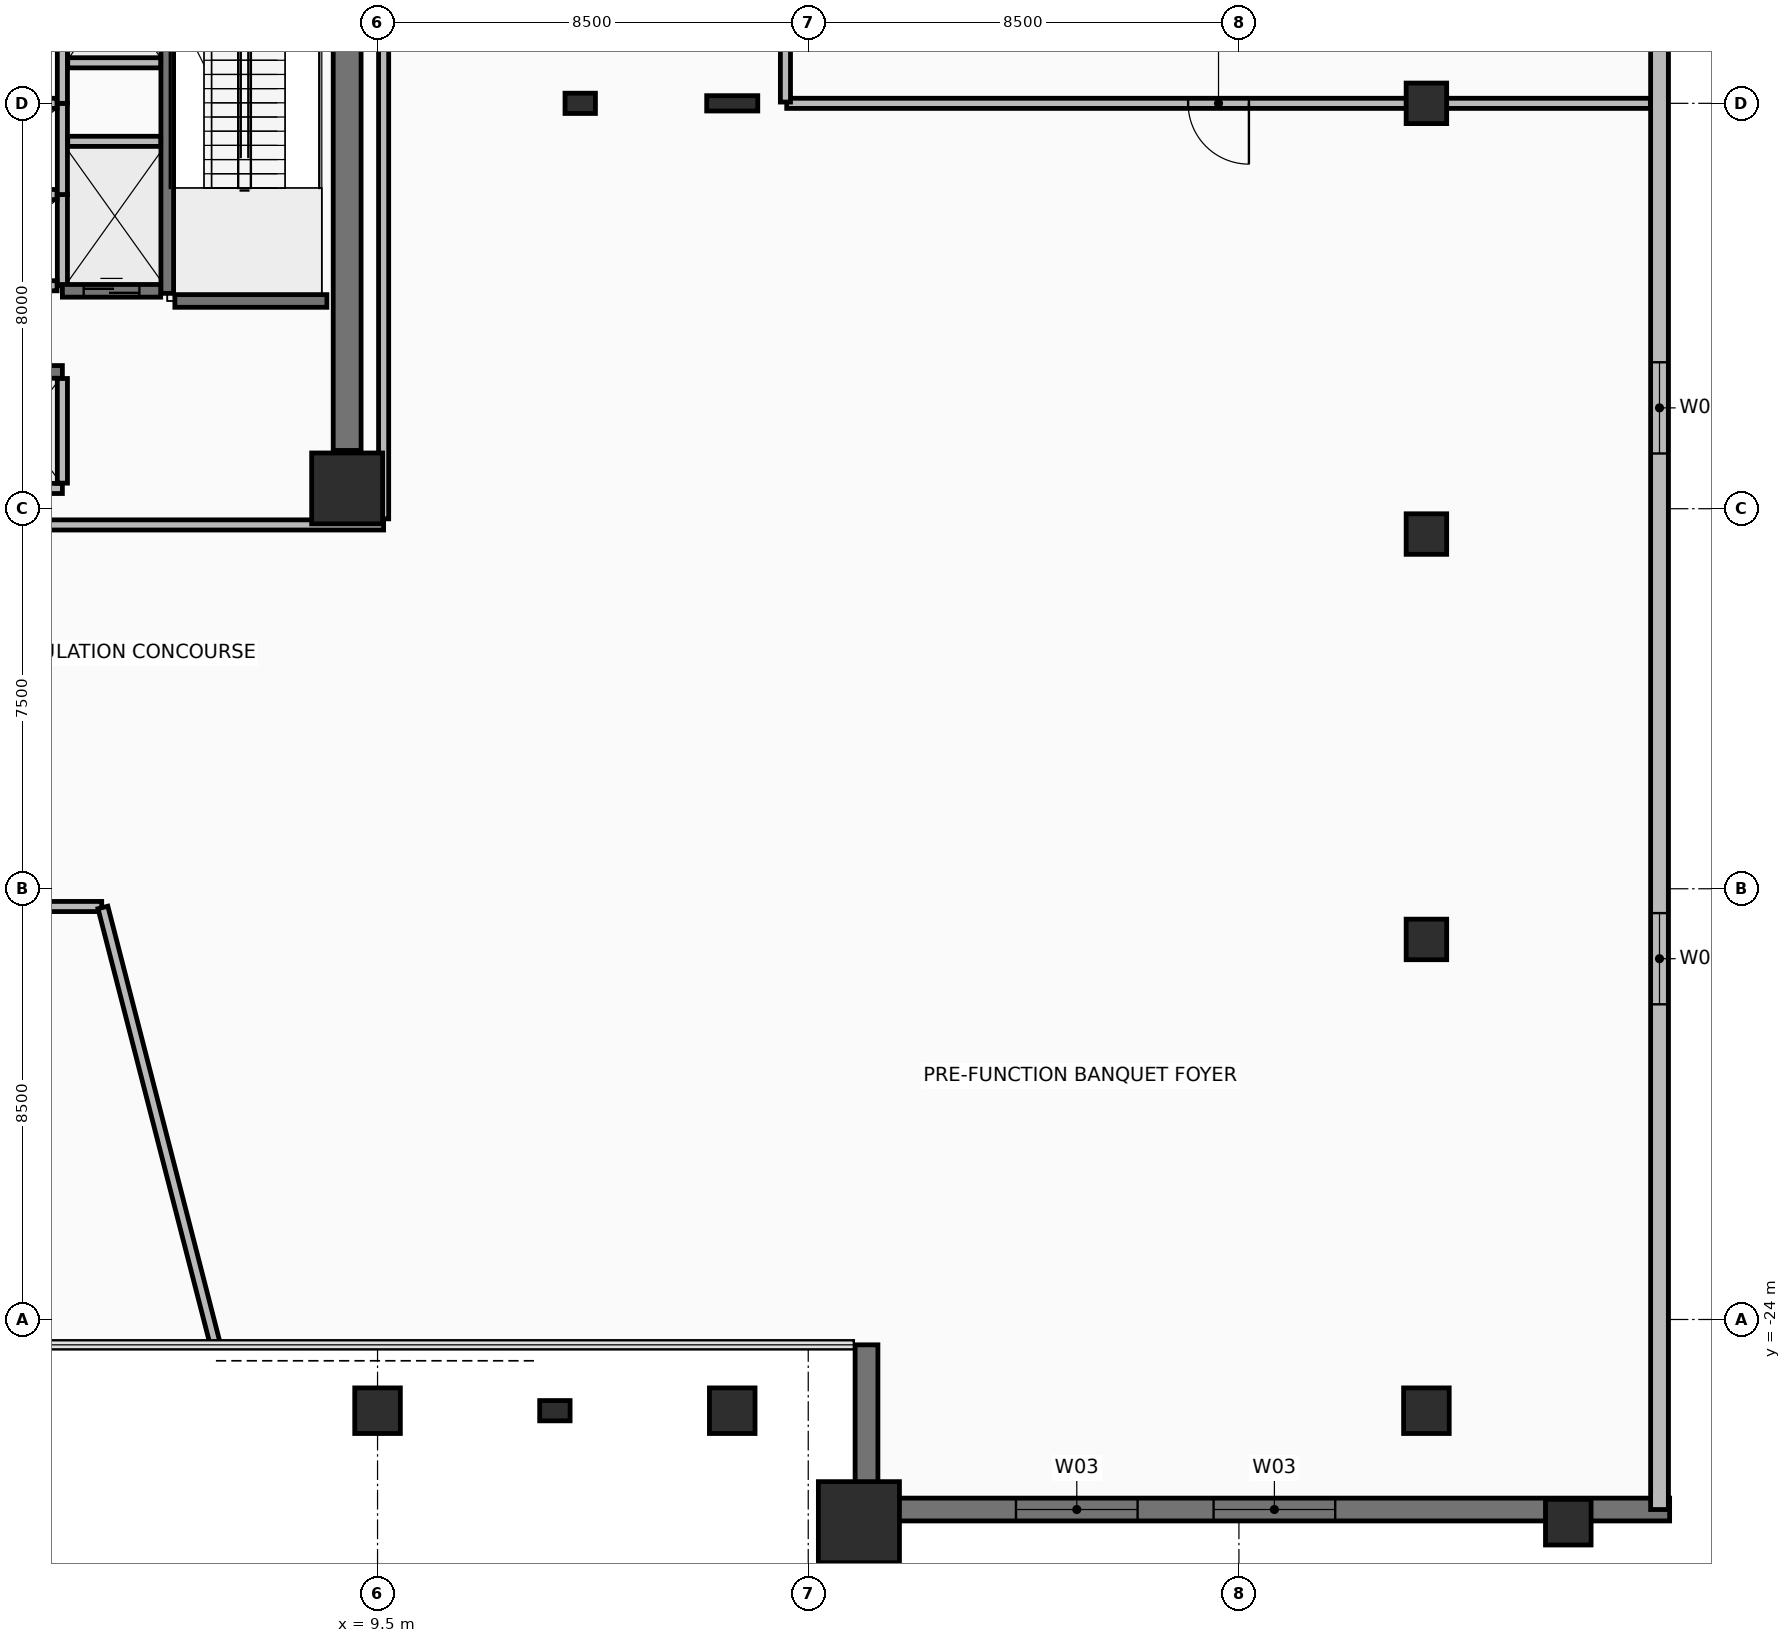
"""IFC4 building model, lengths in metres.
Left out: names, types, materials, properties, quantities, classifications, styles, units other than length and angle.
Written with IfcOpenShell. Run it as: python <this file> out.ifc"""

import sys

from ifc_helpers import new_model, si_unit, direction, frame, frame_2d, origin, origin_2d, place, context, subcontext, project, spatial, rectangle, hollow_rectangle, i_section, extrude, element, fill, save


model = new_model("IFC4")
c1 = context("Model", 3, precision=1e-05, world=origin(), true_north=direction((0.0, 1.0)))
c2 = subcontext(c1, "Body", "Model", "MODEL_VIEW")
j1 = project(units=[si_unit("LENGTHUNIT", "METRE"), si_unit("PLANEANGLEUNIT", "RADIAN")], contexts=[c1])
p1 = place(None, origin())
s1 = spatial("IfcSite", under=j1, at=p1, CompositionType="ELEMENT")
p2 = place(p1, origin())
s2 = spatial("IfcBuilding", under=s1, at=p2, CompositionType="ELEMENT")
p3 = place(p2, frame((0.0, 0.0, 11.0)))
s3 = spatial("IfcBuildingStorey", under=s2, at=p3, CompositionType="ELEMENT", Elevation=11.0)
p4 = place(p3, frame((8.9, -7.6, 0.0), z_axis=(0.0, 0.0, 1.0), x_axis=(1.0, 0.0, 0.0)))
e1 = element("IfcColumn", 1, at=p4, inside=s3, PredefinedType="COLUMN", context=c2, shape_type="SweptSolid", body=[
    extrude(rectangle(XDim=1.4, YDim=1.4, at=origin_2d()), origin(), (0.0, 0.0, 1.0), 5.5),
])
for number, where, z_axis, x_axis in (
    (2, (13.5, 0.0, 0.0), (0.0, 0.0, 1.0), (1.0, 0.0, 0.0)),
    (3, (13.0, -25.8, 0.0), (0.0, 0.0, 1.0), (1.0, 0.0, 0.0)),
):
    element("IfcColumn", number, at=place(p3, frame(where, z_axis=z_axis, x_axis=x_axis)), inside=s3, PredefinedType="PILASTER", context=c2, shape_type="SweptSolid", body=[
        extrude(rectangle(XDim=0.6, YDim=0.4, at=origin_2d()), origin(), (0.0, 0.0, 1.0), 5.5),
    ])
for number, where, z_axis, x_axis in (
    (4, (9.5, -25.8, 0.0), (0.0, 0.0, 1.0), (1.0, 0.0, 0.0)),
    (5, (16.5, -25.8, 0.0), (0.0, 0.0, 1.0), (1.0, 0.0, 0.0)),
    (6, (30.2, -25.8, 0.0), (0.0, 0.0, 1.0), (1.0, 0.0, 0.0)),
):
    element("IfcColumn", number, at=place(p3, frame(where, z_axis=z_axis, x_axis=x_axis)), inside=s3, PredefinedType="COLUMN", context=c2, shape_type="SweptSolid", body=[
        extrude(hollow_rectangle(XDim=0.9, YDim=0.9, WallThickness=0.05, at=origin_2d()), origin(), (0.0, 0.0, 1.0), 5.5),
    ])
for number, where, z_axis, x_axis in (
    (7, (30.2, -16.5, 0.0), (0.0, 0.0, 1.0), (1.0, 0.0, 0.0)),
    (8, (30.2, -8.5, 0.0), (0.0, 0.0, 1.0), (1.0, 0.0, 0.0)),
    (9, (30.2, 0.0, 0.0), (0.0, 0.0, 1.0), (1.0, 0.0, 0.0)),
):
    element("IfcColumn", number, at=place(p3, frame(where, z_axis=z_axis, x_axis=x_axis)), inside=s3, PredefinedType="COLUMN", context=c2, shape_type="SweptSolid", body=[
        extrude(hollow_rectangle(XDim=0.8, YDim=0.8, WallThickness=0.045, at=origin_2d()), origin(), (0.0, 0.0, 1.0), 5.5),
    ])
p5 = place(p3, frame((16.5, 0.0, 0.0), z_axis=(0.0, 0.0, 1.0), x_axis=(1.0, 0.0, 0.0)))
e10 = element("IfcColumn", 10, at=p5, inside=s3, PredefinedType="COLUMN", context=c2, shape_type="SweptSolid", body=[
    extrude(i_section(OverallWidth=0.302, OverallDepth=1.008, WebThickness=0.021, FlangeThickness=0.04, at=origin_2d()), origin(), (0.0, 0.0, 1.0), 5.5),
])
p6 = place(p3, frame((19.0, -28.0, 0.0), z_axis=(0.0, 0.0, 1.0), x_axis=(1.0, 0.0, 0.0)))
e11 = element("IfcColumn", 11, at=p6, inside=s3, PredefinedType="COLUMN", context=c2, shape_type="SweptSolid", body=[
    extrude(rectangle(XDim=1.6, YDim=1.6, at=origin_2d()), origin(), (0.0, 0.0, 1.0), 5.5),
])
p7 = place(p3, frame((33.0, -28.0, 0.0), z_axis=(0.0, 0.0, 1.0), x_axis=(1.0, 0.0, 0.0)))
e12 = element("IfcColumn", 12, at=p7, inside=s3, PredefinedType="COLUMN", context=c2, shape_type="SweptSolid", body=[
    extrude(hollow_rectangle(XDim=0.9, YDim=0.9, WallThickness=0.05, at=origin_2d()), origin(), (0.0, 0.0, 1.0), 5.5),
])
p8 = place(p3, frame((19.4, -27.75, 0.0), z_axis=(0.0, 0.0, 1.0), x_axis=(1.0, 0.0, 0.0)))
e13 = element("IfcWall", 13, at=p8, inside=s3, PredefinedType="STANDARD", context=c2, shape_type="SweptSolid", body=[
    extrude(rectangle(XDim=15.6, YDim=0.45, at=frame_2d((7.8, 0.0))), origin(), (0.0, 0.0, 1.0), 5.24),
])
p9 = place(p8, frame((2.7, 0.0, 0.9)))
e14 = element("IfcOpeningElement", 14, at=p9, cuts=e13, PredefinedType="OPENING", context=c2, shape_type="SweptSolid", body=[
    extrude(rectangle(XDim=2.4, YDim=2.4, at=frame_2d((1.2, 1.2))), frame((0.0, 0.235, 0.0), z_axis=(0.0, -1.0, 0.0), x_axis=(1.0, 0.0, 0.0)), (0.0, 0.0, 1.0), 0.47),
])
p10 = place(p8, frame((6.6, 0.0, 0.9)))
e15 = element("IfcOpeningElement", 15, at=p10, cuts=e13, PredefinedType="OPENING", context=c2, shape_type="SweptSolid", body=[
    extrude(rectangle(XDim=2.4, YDim=2.4, at=frame_2d((1.2, 1.2))), frame((0.0, 0.235, 0.0), z_axis=(0.0, -1.0, 0.0), x_axis=(1.0, 0.0, 0.0)), (0.0, 0.0, 1.0), 0.47),
])
p11 = place(p3, frame((19.15, -24.5, 0.0), z_axis=(0.0, 0.0, 1.0), x_axis=(0.0, -1.0, 0.0)))
e16 = element("IfcWall", 16, at=p11, inside=s3, PredefinedType="STANDARD", context=c2, shape_type="SweptSolid", body=[
    extrude(rectangle(XDim=3.25, YDim=0.45, at=frame_2d((1.625, 0.0))), origin(), (0.0, 0.0, 1.0), 5.24),
])
p12 = place(p3, frame((34.8, -27.75, 0.0), z_axis=(0.0, 0.0, 1.0), x_axis=(0.0, 1.0, 0.0)))
e17 = element("IfcWall", 17, at=p12, inside=s3, PredefinedType="STANDARD", context=c2, shape_type="SweptSolid", body=[
    extrude(rectangle(XDim=54.35, YDim=0.35, at=frame_2d((27.175, 0.0))), origin(), (0.0, 0.0, 1.0), 5.24),
])
p13 = place(p12, frame((9.97, 0.0, 0.95)))
e18 = element("IfcOpeningElement", 18, at=p13, cuts=e17, PredefinedType="OPENING", context=c2, shape_type="SweptSolid", body=[
    extrude(rectangle(XDim=1.8, YDim=2.2, at=frame_2d((0.9, 1.1))), frame((0.0, 0.185, 0.0), z_axis=(0.0, -1.0, 0.0), x_axis=(1.0, 0.0, 0.0)), (0.0, 0.0, 1.0), 0.37),
])
p14 = place(p12, frame((20.84, 0.0, 0.95)))
e19 = element("IfcOpeningElement", 19, at=p14, cuts=e17, PredefinedType="OPENING", context=c2, shape_type="SweptSolid", body=[
    extrude(rectangle(XDim=1.8, YDim=2.2, at=frame_2d((0.9, 1.1))), frame((0.0, 0.185, 0.0), z_axis=(0.0, -1.0, 0.0), x_axis=(1.0, 0.0, 0.0)), (0.0, 0.0, 1.0), 0.37),
])
p15 = place(p12, frame((31.71, 0.0, 0.95)))
e20 = element("IfcOpeningElement", 20, at=p15, cuts=e17, PredefinedType="OPENING", context=c2, shape_type="SweptSolid", body=[
    extrude(rectangle(XDim=1.8, YDim=2.2, at=frame_2d((0.9, 1.1))), frame((0.0, 0.185, 0.0), z_axis=(0.0, -1.0, 0.0), x_axis=(1.0, 0.0, 0.0)), (0.0, 0.0, 1.0), 0.37),
])
p16 = place(p12, frame((42.58, 0.0, 0.95)))
e21 = element("IfcOpeningElement", 21, at=p16, cuts=e17, PredefinedType="OPENING", context=c2, shape_type="SweptSolid", body=[
    extrude(rectangle(XDim=1.8, YDim=2.2, at=frame_2d((0.9, 1.1))), frame((0.0, 0.185, 0.0), z_axis=(0.0, -1.0, 0.0), x_axis=(1.0, 0.0, 0.0)), (0.0, 0.0, 1.0), 0.37),
])
p17 = place(p3, frame((8.9, -6.85, 0.0), z_axis=(0.0, 0.0, 1.0), x_axis=(0.0, 1.0, 0.0)))
e22 = element("IfcWall", 22, at=p17, inside=s3, PredefinedType="SHEAR", context=c2, shape_type="SweptSolid", body=[
    extrude(rectangle(XDim=10.7, YDim=0.55, at=frame_2d((5.35, 0.0))), origin(), (0.0, 0.0, 1.0), 5.24),
])
p18 = place(p3, frame((-9.62, -8.32, 0.0), z_axis=(0.0, 0.0, 1.0), x_axis=(1.0, 0.0, 0.0)))
e23 = element("IfcWall", 23, at=p18, inside=s3, PredefinedType="PARTITIONING", context=c2, shape_type="SweptSolid", body=[
    extrude(rectangle(XDim=19.24, YDim=0.2, at=frame_2d((9.62, 0.0))), origin(), (0.0, 0.0, 1.0), 3.435),
])
p19 = place(p3, frame((9.62, -8.2, 0.0), z_axis=(0.0, 0.0, 1.0), x_axis=(0.0, 1.0, 0.0)))
e24 = element("IfcWall", 24, at=p19, inside=s3, PredefinedType="PARTITIONING", context=c2, shape_type="SweptSolid", body=[
    extrude(rectangle(XDim=16.4, YDim=0.2, at=frame_2d((8.2, 0.0))), origin(), (0.0, 0.0, 1.0), 3.435),
])
p20 = place(p19, frame((12.65, 0.0, 0.0)))
e25 = element("IfcOpeningElement", 25, at=p20, cuts=e24, PredefinedType="OPENING", context=c2, shape_type="SweptSolid", body=[
    extrude(rectangle(XDim=1.1, YDim=2.15, at=frame_2d((0.55, 1.075))), frame((0.0, 0.11, 0.0), z_axis=(0.0, -1.0, 0.0), x_axis=(1.0, 0.0, 0.0)), (0.0, 0.0, 1.0), 0.22),
])
p21 = place(p3, frame((5.35, -3.75, 0.0), z_axis=(0.0, 0.0, 1.0), x_axis=(0.0, 1.0, 0.0)))
e26 = element("IfcWall", 26, at=p21, inside=s3, PredefinedType="SHEAR", context=c2, shape_type="SweptSolid", body=[
    extrude(rectangle(XDim=7.3, YDim=0.25, at=frame_2d((3.65, 0.0))), origin(), (0.0, 0.0, 1.0), 5.24),
])
p22 = place(p3, frame((5.5, -3.9, 0.0), z_axis=(0.0, 0.0, 1.0), x_axis=(1.0, 0.0, 0.0)))
e27 = element("IfcWall", 27, at=p22, inside=s3, PredefinedType="SHEAR", context=c2, shape_type="SweptSolid", body=[
    extrude(rectangle(XDim=3.0, YDim=0.25, at=frame_2d((1.5, 0.0))), origin(), (0.0, 0.0, 1.0), 5.24),
])
p23 = place(p3, frame((1.637, -5.3, 0.0), z_axis=(0.0, 0.0, 1.0), x_axis=(1.0, 0.0, 0.0)))
e28 = element("IfcWall", 28, at=p23, inside=s3, PredefinedType="SHEAR", context=c2, shape_type="SweptSolid", body=[
    extrude(rectangle(XDim=1.643, YDim=0.25, at=frame_2d((0.821, 0.0))), origin(), (0.0, 0.0, 1.0), 5.24),
])
p24 = place(p23, frame((0.271, 0.0, 0.0)))
e29 = element("IfcOpeningElement", 29, at=p24, cuts=e28, PredefinedType="OPENING", context=c2, shape_type="SweptSolid", body=[
    extrude(rectangle(XDim=1.1, YDim=2.2, at=frame_2d((0.55, 1.1))), frame((0.0, 0.135, 0.0), z_axis=(0.0, -1.0, 0.0), x_axis=(1.0, 0.0, 0.0)), (0.0, 0.0, 1.0), 0.27),
])
p25 = place(p3, frame((2.58, -7.6, 0.0), z_axis=(0.0, 0.0, 1.0), x_axis=(1.0, 0.0, 0.0)))
e30 = element("IfcWall", 30, at=p25, inside=s3, PredefinedType="PARTITIONING", context=c2, shape_type="SweptSolid", body=[
    extrude(rectangle(XDim=0.7, YDim=0.2, at=frame_2d((0.35, 0.0))), origin(), (0.0, 0.0, 1.0), 4.435),
])
p26 = place(p3, frame((3.28, -7.495, 0.0), z_axis=(0.0, 0.0, 1.0), x_axis=(0.0, 1.0, 0.0)))
e31 = element("IfcWall", 31, at=p26, inside=s3, PredefinedType="PARTITIONING", context=c2, shape_type="SweptSolid", body=[
    extrude(rectangle(XDim=2.065, YDim=0.2, at=frame_2d((1.033, 0.0))), origin(), (0.0, 0.0, 1.0), 4.435),
])
p27 = place(p3, frame((3.28, -3.6, 0.0), z_axis=(0.0, 0.0, 1.0), x_axis=(0.0, 1.0, 0.0)))
e32 = element("IfcWall", 32, at=p27, inside=s3, PredefinedType="PARTITIONING", context=c2, shape_type="SweptSolid", body=[
    extrude(rectangle(XDim=1.8, YDim=0.2, at=frame_2d((0.9, 0.0))), origin(), (0.0, 0.0, 1.0), 5.24),
])
for number, where, z_axis, x_axis in (
    (33, (1.13, -3.6, 0.0), (0.0, 0.0, 1.0), (1.0, 0.0, 0.0)),
    (34, (1.13, -1.8, 0.0), (0.0, 0.0, 1.0), (1.0, 0.0, 0.0)),
):
    element("IfcWall", number, at=place(p3, frame(where, z_axis=z_axis, x_axis=x_axis)), inside=s3, PredefinedType="PARTITIONING", context=c2, shape_type="SweptSolid", body=[
        extrude(rectangle(XDim=2.045, YDim=0.2, at=frame_2d((1.022, 0.0))), origin(), (0.0, 0.0, 1.0), 5.24),
    ])
p28 = place(p3, frame((3.28, -1.8, 0.0), z_axis=(0.0, 0.0, 1.0), x_axis=(0.0, 1.0, 0.0)))
e35 = element("IfcWall", 35, at=p28, inside=s3, PredefinedType="PARTITIONING", context=c2, shape_type="SweptSolid", body=[
    extrude(rectangle(XDim=1.8, YDim=0.2, at=frame_2d((0.9, 0.0))), origin(), (0.0, 0.0, 1.0), 5.24),
])
p29 = place(p3, frame((1.13, 0.0, 0.0), z_axis=(0.0, 0.0, 1.0), x_axis=(1.0, 0.0, 0.0)))
e36 = element("IfcWall", 36, at=p29, inside=s3, PredefinedType="PARTITIONING", context=c2, shape_type="SweptSolid", body=[
    extrude(rectangle(XDim=2.045, YDim=0.2, at=frame_2d((1.022, 0.0))), origin(), (0.0, 0.0, 1.0), 5.24),
])
p30 = place(p3, frame((3.28, 0.0, 0.0), z_axis=(0.0, 0.0, 1.0), x_axis=(0.0, 1.0, 0.0)))
e37 = element("IfcWall", 37, at=p30, inside=s3, PredefinedType="PARTITIONING", context=c2, shape_type="SweptSolid", body=[
    extrude(rectangle(XDim=1.8, YDim=0.2, at=frame_2d((0.9, 0.0))), origin(), (0.0, 0.0, 1.0), 5.24),
])
p31 = place(p3, frame((3.385, 0.8, 0.0), z_axis=(0.0, 0.0, 1.0), x_axis=(1.0, 0.0, 0.0)))
e38 = element("IfcWall", 38, at=p31, inside=s3, PredefinedType="PARTITIONING", context=c2, shape_type="SweptSolid", body=[
    extrude(rectangle(XDim=1.835, YDim=0.2, at=frame_2d((0.917, 0.0))), origin(), (0.0, 0.0, 1.0), 5.24),
])
p32 = place(p3, frame((3.28, -3.7, 0.0), z_axis=(0.0, 0.0, 1.0), x_axis=(1.0, 0.0, 0.0)))
e39 = element("IfcWall", 39, at=p32, inside=s3, PredefinedType="SHEAR", context=c2, shape_type="SweptSolid", body=[
    extrude(rectangle(XDim=1.94, YDim=0.25, at=frame_2d((0.97, 0.0))), origin(), (0.0, 0.0, 1.0), 5.24),
])
p33 = place(p32, frame((0.42, 0.0, 0.0)))
e40 = element("IfcOpeningElement", 40, at=p33, cuts=e39, PredefinedType="OPENING", context=c2, shape_type="SweptSolid", body=[
    extrude(rectangle(XDim=1.1, YDim=2.2, at=frame_2d((0.55, 1.1))), frame((0.0, 0.135, 0.0), z_axis=(0.0, -1.0, 0.0), x_axis=(1.0, 0.0, 0.0)), (0.0, 0.0, 1.0), 0.27),
])
p34 = place(p3, frame((3.385, -0.75, 0.0), z_axis=(0.0, 0.0, 1.0), x_axis=(1.0, 0.0, 0.0)))
e41 = element("IfcWall", 41, at=p34, inside=s3, PredefinedType="PARTITIONING", context=c2, shape_type="SweptSolid", body=[
    extrude(rectangle(XDim=1.835, YDim=0.2, at=frame_2d((0.917, 0.0))), origin(), (0.0, 0.0, 1.0), 5.24),
])
p35 = place(p3, frame((34.62, 0.0, 0.0), z_axis=(0.0, 0.0, 1.0), x_axis=(-1.0, 0.0, 0.0)))
e42 = element("IfcWall", 42, at=p35, inside=s3, PredefinedType="PARTITIONING", context=c2, shape_type="SweptSolid", body=[
    extrude(rectangle(XDim=17.045, YDim=0.2, at=frame_2d((8.522, 0.0))), origin(), (0.0, 0.0, 1.0), 3.435),
])
p36 = place(p35, frame((7.923, 0.0, 0.0)))
e43 = element("IfcOpeningElement", 43, at=p36, cuts=e42, PredefinedType="OPENING", context=c2, shape_type="SweptSolid", body=[
    extrude(rectangle(XDim=1.2, YDim=2.15, at=frame_2d((0.6, 1.075))), frame((0.0, 0.11, 0.0), z_axis=(0.0, -1.0, 0.0), x_axis=(1.0, 0.0, 0.0)), (0.0, 0.0, 1.0), 0.22),
])
p37 = place(p3, frame((17.55, 0.025, 0.0), z_axis=(0.0, 0.0, 1.0), x_axis=(0.0, 1.0, 0.0)))
e44 = element("IfcWall", 44, at=p37, inside=s3, PredefinedType="PARTITIONING", context=c2, shape_type="SweptSolid", body=[
    extrude(rectangle(XDim=8.75, YDim=0.2, at=frame_2d((4.375, 0.0))), origin(), (0.0, 0.0, 1.0), 3.435),
])
p38 = place(p3, frame((-17.525, -15.85, 0.0), z_axis=(0.0, 0.0, 1.0), x_axis=(1.0, 0.0, 0.0)))
e45 = element("IfcWall", 45, at=p38, inside=s3, PredefinedType="PARTITIONING", context=c2, shape_type="SweptSolid", body=[
    extrude(rectangle(XDim=21.581, YDim=0.2, at=frame_2d((10.791, 0.0))), origin(), (0.0, 0.0, 1.0), 2.935),
])
p39 = place(p38, frame((10.191, 0.0, 0.0)))
e46 = element("IfcOpeningElement", 46, at=p39, cuts=e45, PredefinedType="OPENING", context=c2, shape_type="SweptSolid", body=[
    extrude(rectangle(XDim=1.2, YDim=2.15, at=frame_2d((0.6, 1.075))), frame((0.0, 0.11, 0.0), z_axis=(0.0, -1.0, 0.0), x_axis=(1.0, 0.0, 0.0)), (0.0, 0.0, 1.0), 0.22),
])
p40 = place(p3, frame((4.08, -15.869, 0.0), z_axis=(0.0, 0.0, 1.0), x_axis=(0.249021217136, -0.96849802964, 0.0)))
e47 = element("IfcWall", 47, at=p40, inside=s3, PredefinedType="PARTITIONING", context=c2, shape_type="SweptSolid", body=[
    extrude(rectangle(XDim=8.912, YDim=0.2, at=frame_2d((4.456, 0.0))), origin(), (0.0, 0.0, 1.0), 4.785),
])
p41 = place(p9, origin())
e48 = element("IfcWindow", 48, at=p41, inside=s3, PartitioningType="SINGLE_PANEL", PredefinedType="WINDOW", context=c2, shape_type="SweptSolid", body=[
    extrude(rectangle(XDim=2.4, YDim=2.4, at=frame_2d((1.2, 1.2))), frame((0.0, 0.03, 0.0), z_axis=(0.0, -1.0, 0.0), x_axis=(1.0, 0.0, 0.0)), (0.0, 0.0, 1.0), 0.06),
])
fill(e14, e48)
p42 = place(p10, origin())
e49 = element("IfcWindow", 49, at=p42, inside=s3, PartitioningType="SINGLE_PANEL", PredefinedType="WINDOW", context=c2, shape_type="SweptSolid", body=[
    extrude(rectangle(XDim=2.4, YDim=2.4, at=frame_2d((1.2, 1.2))), frame((0.0, 0.03, 0.0), z_axis=(0.0, -1.0, 0.0), x_axis=(1.0, 0.0, 0.0)), (0.0, 0.0, 1.0), 0.06),
])
fill(e15, e49)
p43 = place(p13, origin())
e50 = element("IfcWindow", 50, at=p43, inside=s3, PartitioningType="SINGLE_PANEL", PredefinedType="WINDOW", context=c2, shape_type="SweptSolid", body=[
    extrude(rectangle(XDim=1.8, YDim=2.2, at=frame_2d((0.9, 1.1))), frame((0.0, 0.03, 0.0), z_axis=(0.0, -1.0, 0.0), x_axis=(1.0, 0.0, 0.0)), (0.0, 0.0, 1.0), 0.06),
])
fill(e18, e50)
p44 = place(p14, origin())
e51 = element("IfcWindow", 51, at=p44, inside=s3, PartitioningType="SINGLE_PANEL", PredefinedType="WINDOW", context=c2, shape_type="SweptSolid", body=[
    extrude(rectangle(XDim=1.8, YDim=2.2, at=frame_2d((0.9, 1.1))), frame((0.0, 0.03, 0.0), z_axis=(0.0, -1.0, 0.0), x_axis=(1.0, 0.0, 0.0)), (0.0, 0.0, 1.0), 0.06),
])
fill(e19, e51)
p45 = place(p33, origin())
e52 = element("IfcDoor", 52, at=p45, inside=s3, OperationType="SLIDING_TO_LEFT", PredefinedType="DOOR", context=c2, shape_type="SweptSolid", body=[
    extrude(rectangle(XDim=1.1, YDim=2.2, at=frame_2d((0.55, 1.1))), frame((0.0, 0.025, 0.0), z_axis=(0.0, -1.0, 0.0), x_axis=(1.0, 0.0, 0.0)), (0.0, 0.0, 1.0), 0.05),
])
fill(e40, e52)
p46 = place(p36, origin())
e53 = element("IfcDoor", 53, at=p46, inside=s3, OperationType="SINGLE_SWING_LEFT", PredefinedType="DOOR", context=c2, shape_type="SweptSolid", body=[
    extrude(rectangle(XDim=1.2, YDim=2.15, at=frame_2d((0.6, 1.075))), frame((0.0, 0.025, 0.0), z_axis=(0.0, -1.0, 0.0), x_axis=(1.0, 0.0, 0.0)), (0.0, 0.0, 1.0), 0.05),
])
fill(e43, e53)
save(model, sys.argv[1])
